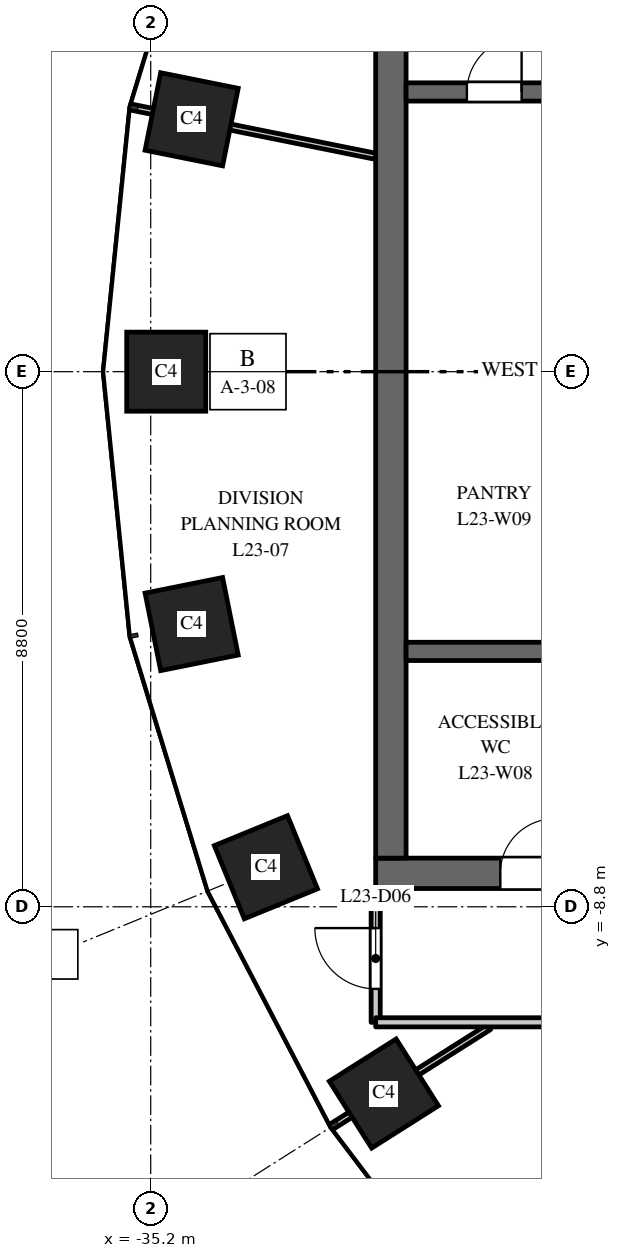
"""IFC4 building model, lengths in metres.
Left out: names, types, materials, properties, quantities, classifications, styles, units other than length and angle.
Written with IfcOpenShell. Run it as: python <this file> out.ifc"""

import sys

from ifc_helpers import new_model, si_unit, direction, frame, frame_2d, origin, origin_2d, place, context, subcontext, project, spatial, rectangle, extrude, element, fill, save


model = new_model("IFC4")
c1 = context("Model", 3, precision=1e-05, world=origin(), true_north=direction((0.0, 1.0)))
c2 = subcontext(c1, "Body", "Model", "MODEL_VIEW")
j1 = project(units=[si_unit("LENGTHUNIT", "METRE"), si_unit("PLANEANGLEUNIT", "RADIAN")], contexts=[c1])
p1 = place(None, origin())
s1 = spatial("IfcSite", under=j1, at=p1, CompositionType="ELEMENT")
p2 = place(p1, origin())
s2 = spatial("IfcBuilding", under=s1, at=p2, CompositionType="ELEMENT")
p3 = place(p2, frame((0.0, 0.0, 104.0)))
s3 = spatial("IfcBuildingStorey", under=s2, at=p3, CompositionType="ELEMENT", Elevation=104.0)
for number, where, z_axis, x_axis in (
    (1, (-34.527, 4.151, 0.0), (0.0, 0.0, 1.0), (-0.197, -0.98, 0.0)),
    (2, (-34.945, 0.0, 0.0), (0.0, 0.0, 1.0), (0.0, -1.0, 0.0)),
    (3, (-34.527, -4.151, 0.0), (0.0, 0.0, 1.0), (0.197, -0.98, 0.0)),
    (4, (-33.305, -8.149, 0.0), (0.0, 0.0, 1.0), (0.379, -0.925, 0.0)),
    (5, (-31.365, -11.871, 0.0), (0.0, 0.0, 1.0), (0.535, -0.845, 0.0)),
):
    element("IfcColumn", number, at=place(p3, frame(where, z_axis=z_axis, x_axis=x_axis)), inside=s3, PredefinedType="COLUMN", context=c2, shape_type="SweptSolid", body=[
        extrude(rectangle(XDim=1.3, YDim=1.3, at=origin_2d()), origin(), (0.0, 0.0, 1.0), 4.0),
    ])
p4 = place(p3, frame((-16.5, -8.25, 0.0), z_axis=(0.0, 0.0, 1.0), x_axis=(-1.0, 0.0, 0.0)))
e6 = element("IfcWall", 6, at=p4, inside=s3, PredefinedType="SHEAR", context=c2, shape_type="SweptSolid", body=[
    extrude(rectangle(XDim=15.0, YDim=0.5, at=frame_2d((7.5, 0.0))), origin(), (0.0, 0.0, 1.0), 3.7),
])
p5 = place(p4, frame((6.9, 0.0, 0.0)))
e7 = element("IfcOpeningElement", 7, at=p5, cuts=e6, PredefinedType="OPENING", context=c2, shape_type="SweptSolid", body=[
    extrude(rectangle(XDim=1.2, YDim=2.1, at=frame_2d((0.6, 1.05))), frame((0.0, 0.26, 0.0), z_axis=(0.0, -1.0, 0.0), x_axis=(1.0, 0.0, 0.0)), (0.0, 0.0, 1.0), 0.52),
])
p6 = place(p4, frame((12.05, 0.0, 0.0)))
e8 = element("IfcOpeningElement", 8, at=p6, cuts=e6, PredefinedType="OPENING", context=c2, shape_type="SweptSolid", body=[
    extrude(rectangle(XDim=0.9, YDim=2.1, at=frame_2d((0.45, 1.05))), frame((0.0, 0.26, 0.0), z_axis=(0.0, -1.0, 0.0), x_axis=(1.0, 0.0, 0.0)), (0.0, 0.0, 1.0), 0.52),
])
p7 = place(p3, frame((-31.25, -8.0, 0.0), z_axis=(0.0, 0.0, 1.0), x_axis=(0.0, 1.0, 0.0)))
e9 = element("IfcWall", 9, at=p7, inside=s3, PredefinedType="SHEAR", context=c2, shape_type="SweptSolid", body=[
    extrude(rectangle(XDim=16.0, YDim=0.5, at=frame_2d((8.0, 0.0))), origin(), (0.0, 0.0, 1.0), 3.7),
])
p8 = place(p3, frame((-24.9, 4.6, 0.0), z_axis=(0.0, 0.0, 1.0), x_axis=(-1.0, 0.0, 0.0)))
e10 = element("IfcWall", 10, at=p8, inside=s3, PredefinedType="SHEAR", context=c2, shape_type="SweptSolid", body=[
    extrude(rectangle(XDim=6.1, YDim=0.3, at=frame_2d((3.05, 0.0))), origin(), (0.0, 0.0, 1.0), 3.7),
])
p9 = place(p8, frame((4.2, 0.0, 0.0)))
e11 = element("IfcOpeningElement", 11, at=p9, cuts=e10, PredefinedType="OPENING", context=c2, shape_type="SweptSolid", body=[
    extrude(rectangle(XDim=0.9, YDim=2.1, at=frame_2d((0.45, 1.05))), frame((0.0, 0.16, 0.0), z_axis=(0.0, -1.0, 0.0), x_axis=(1.0, 0.0, 0.0)), (0.0, 0.0, 1.0), 0.32),
])
p10 = place(p3, frame((-24.9, -4.6, 0.0), z_axis=(0.0, 0.0, 1.0), x_axis=(-1.0, 0.0, 0.0)))
e12 = element("IfcWall", 12, at=p10, inside=s3, PredefinedType="SHEAR", context=c2, shape_type="SweptSolid", body=[
    extrude(rectangle(XDim=6.1, YDim=0.3, at=frame_2d((3.05, 0.0))), origin(), (0.0, 0.0, 1.0), 3.7),
])
p11 = place(p3, frame((-35.512, 4.349, 0.0), z_axis=(0.0, 0.0, 1.0), x_axis=(0.980357474535, -0.197228857227, 0.0)))
e13 = element("IfcWall", 13, at=p11, inside=s3, PredefinedType="PARTITIONING", context=c2, shape_type="SweptSolid", body=[
    extrude(rectangle(XDim=4.092, YDim=0.1, at=frame_2d((2.046, 0.0))), origin(), (0.0, 0.0, 1.0), 3.2),
])
p12 = place(p3, frame((-32.212, -12.408, 0.0), z_axis=(0.0, 0.0, 1.0), x_axis=(0.844810627195, 0.535065420467, 0.0)))
e14 = element("IfcWall", 14, at=p12, inside=s3, PredefinedType="PARTITIONING", context=c2, shape_type="SweptSolid", body=[
    extrude(rectangle(XDim=3.048, YDim=0.1, at=frame_2d((1.524, 0.0))), origin(), (0.0, 0.0, 1.0), 3.7),
])
p13 = place(p3, frame((-31.5, -10.7, 0.0), z_axis=(0.0, 0.0, 1.0), x_axis=(0.0, 1.0, 0.0)))
e15 = element("IfcWall", 15, at=p13, inside=s3, PredefinedType="PARTITIONING", context=c2, shape_type="SweptSolid", body=[
    extrude(rectangle(XDim=2.2, YDim=0.15, at=frame_2d((1.1, 0.0))), origin(), (0.0, 0.0, 1.0), 3.7),
])
p14 = place(p13, frame((0.55, 0.0, 0.0)))
e16 = element("IfcOpeningElement", 16, at=p14, cuts=e15, PredefinedType="OPENING", context=c2, shape_type="SweptSolid", body=[
    extrude(rectangle(XDim=1.0, YDim=2.1, at=frame_2d((0.5, 1.05))), frame((0.0, 0.085, 0.0), z_axis=(0.0, -1.0, 0.0), x_axis=(1.0, 0.0, 0.0)), (0.0, 0.0, 1.0), 0.17),
])
p15 = place(p3, frame((-31.5, -10.7, 0.0), z_axis=(0.0, 0.0, 1.0), x_axis=(1.0, 0.0, 0.0)))
e17 = element("IfcWall", 17, at=p15, inside=s3, PredefinedType="PARTITIONING", context=c2, shape_type="SweptSolid", body=[
    extrude(rectangle(XDim=15.0, YDim=0.15, at=frame_2d((7.5, 0.0))), origin(), (0.0, 0.0, 1.0), 3.1),
])
p16 = place(p6, origin())
e18 = element("IfcDoor", 18, at=p16, inside=s3, OperationType="SINGLE_SWING_LEFT", PredefinedType="DOOR", context=c2, shape_type="SweptSolid", body=[
    extrude(rectangle(XDim=0.9, YDim=2.1, at=frame_2d((0.45, 1.05))), frame((0.0, 0.025, 0.0), z_axis=(0.0, -1.0, 0.0), x_axis=(1.0, 0.0, 0.0)), (0.0, 0.0, 1.0), 0.05),
])
fill(e8, e18)
p17 = place(p9, origin())
e19 = element("IfcDoor", 19, at=p17, inside=s3, OperationType="SINGLE_SWING_LEFT", PredefinedType="DOOR", context=c2, shape_type="SweptSolid", body=[
    extrude(rectangle(XDim=0.9, YDim=2.1, at=frame_2d((0.45, 1.05))), frame((0.0, 0.025, 0.0), z_axis=(0.0, -1.0, 0.0), x_axis=(1.0, 0.0, 0.0)), (0.0, 0.0, 1.0), 0.05),
])
fill(e11, e19)
p18 = place(p14, origin())
e20 = element("IfcDoor", 20, at=p18, inside=s3, OperationType="SINGLE_SWING_RIGHT", PredefinedType="DOOR", context=c2, shape_type="SweptSolid", body=[
    extrude(rectangle(XDim=1.0, YDim=2.1, at=frame_2d((0.5, 1.05))), frame((0.0, 0.025, 0.0), z_axis=(0.0, -1.0, 0.0), x_axis=(1.0, 0.0, 0.0)), (0.0, 0.0, 1.0), 0.05),
])
fill(e16, e20)
save(model, sys.argv[1])
